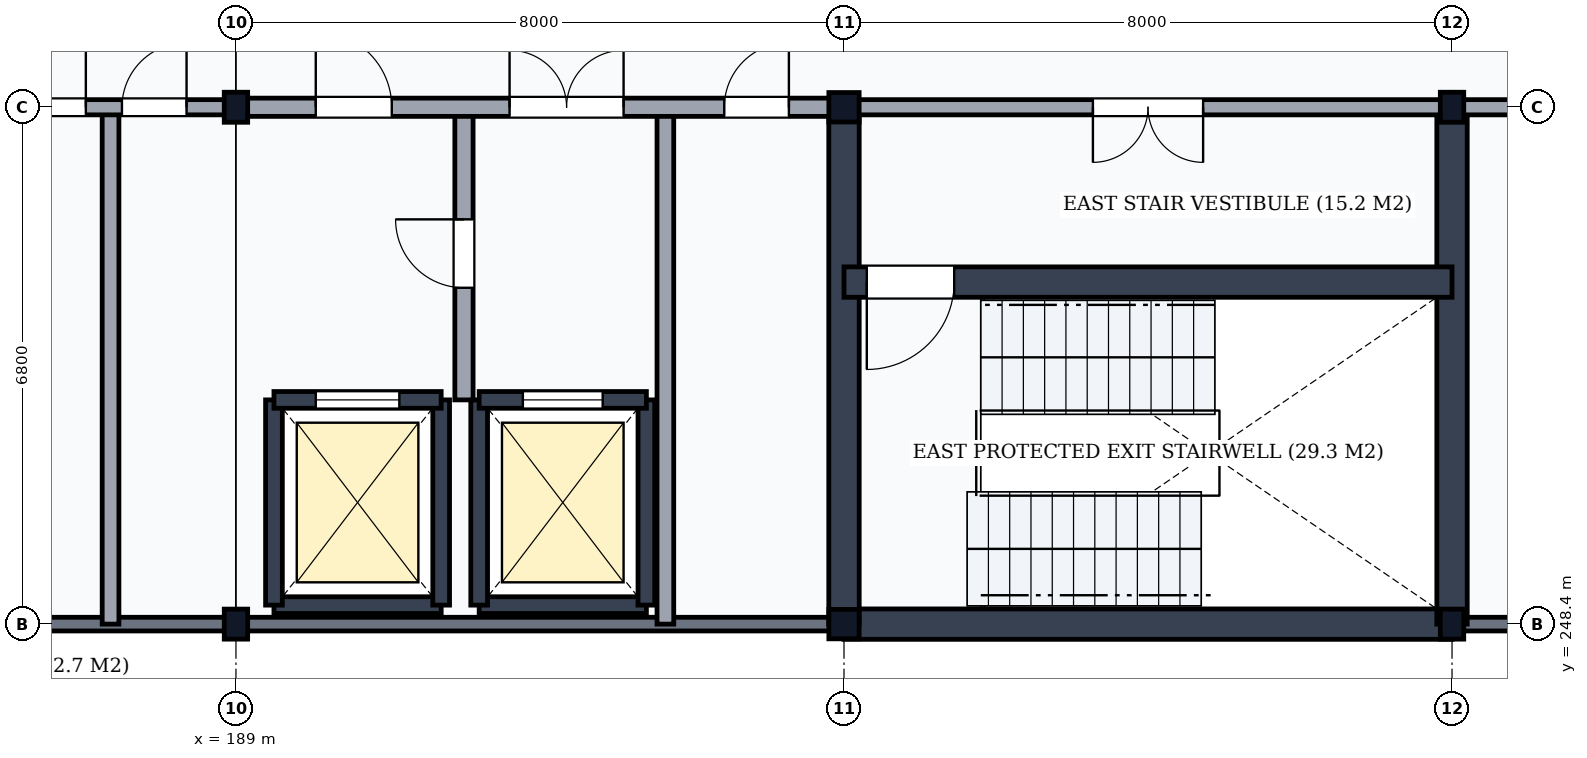
"""IFC4 building model, lengths in metres.
Left out: names, types, materials, properties, quantities, classifications, styles, units other than length and angle.
Written with IfcOpenShell. Run it as: python <this file> out.ifc"""

import sys

from ifc_helpers import new_model, si_unit, direction, frame, frame_2d, origin, origin_2d, place, context, subcontext, project, spatial, rectangle, i_section, extrude, element, fill, save


model = new_model("IFC4")
c1 = context("Model", 3, precision=1e-05, world=origin(), true_north=direction((0.0, 1.0)))
c2 = subcontext(c1, "Body", "Model", "MODEL_VIEW")
j1 = project(units=[si_unit("LENGTHUNIT", "METRE"), si_unit("PLANEANGLEUNIT", "RADIAN")], contexts=[c1])
p1 = place(None, origin())
s1 = spatial("IfcSite", under=j1, at=p1, CompositionType="ELEMENT")
p2 = place(p1, origin())
s2 = spatial("IfcBuilding", under=s1, at=p2, CompositionType="ELEMENT")
p3 = place(p2, frame((0.0, 0.0, 36.0)))
s3 = spatial("IfcBuildingStorey", under=s2, at=p3, CompositionType="ELEMENT", Elevation=36.0)
for number, where, z_axis, x_axis in (
    (1, (189.0, 248.4, 0.0), (0.0, 0.0, 1.0), (1.0, 0.0, 0.0)),
    (2, (189.0, 255.2, 0.0), (0.0, 0.0, 1.0), (1.0, 0.0, 0.0)),
):
    element("IfcColumn", number, at=place(p3, frame(where, z_axis=z_axis, x_axis=x_axis)), inside=s3, PredefinedType="COLUMN", context=c2, shape_type="SweptSolid", body=[
        extrude(i_section(OverallWidth=0.308, OverallDepth=0.395, WebThickness=0.021, FlangeThickness=0.04, FilletRadius=0.027, at=origin_2d()), origin(), (0.0, 0.0, 1.0), 3.9),
    ])
for number, where, z_axis, x_axis in (
    (3, (197.0, 248.4, 0.0), (0.0, 0.0, 1.0), (1.0, 0.0, 0.0)),
    (4, (197.0, 255.2, 0.0), (0.0, 0.0, 1.0), (1.0, 0.0, 0.0)),
):
    element("IfcColumn", number, at=place(p3, frame(where, z_axis=z_axis, x_axis=x_axis)), inside=s3, PredefinedType="COLUMN", context=c2, shape_type="SweptSolid", body=[
        extrude(i_section(OverallWidth=0.398, OverallDepth=0.387, WebThickness=0.021, FlangeThickness=0.033, FilletRadius=0.015, at=origin_2d()), origin(), (0.0, 0.0, 1.0), 3.9),
    ])
for number, where, z_axis, x_axis in (
    (5, (205.0, 248.4, 0.0), (0.0, 0.0, 1.0), (1.0, 0.0, 0.0)),
    (6, (205.0, 255.2, 0.0), (0.0, 0.0, 1.0), (1.0, 0.0, 0.0)),
):
    element("IfcColumn", number, at=place(p3, frame(where, z_axis=z_axis, x_axis=x_axis)), inside=s3, PredefinedType="COLUMN", context=c2, shape_type="SweptSolid", body=[
        extrude(i_section(OverallWidth=0.308, OverallDepth=0.395, WebThickness=0.021, FlangeThickness=0.04, FilletRadius=0.027, at=origin_2d()), origin(), (0.0, 0.0, 1.0), 3.9),
    ])
p4 = place(p3, frame((181.006, 248.4, 0.0), z_axis=(0.0, 0.0, 1.0), x_axis=(1.0, 0.0, 0.0)))
e7 = element("IfcWall", 7, at=p4, inside=s3, PredefinedType="SOLIDWALL", context=c2, shape_type="SweptSolid", body=[
    extrude(rectangle(XDim=7.988, YDim=0.18, at=frame_2d((3.994, 0.0))), origin(), (0.0, 0.0, 1.0), 3.368),
])
p5 = place(p4, frame((3.319, 0.0, 0.85)))
e8 = element("IfcOpeningElement", 8, at=p5, cuts=e7, PredefinedType="OPENING", context=c2, shape_type="SweptSolid", body=[
    extrude(rectangle(XDim=0.75, YDim=2.0, at=frame_2d((0.375, 1.0))), frame((0.0, 0.105, 0.0), z_axis=(0.0, -1.0, 0.0), x_axis=(1.0, 0.0, 0.0)), (0.0, 0.0, 1.0), 0.21),
])
p6 = place(p3, frame((189.006, 248.4, 0.0), z_axis=(0.0, 0.0, 1.0), x_axis=(1.0, 0.0, 0.0)))
e9 = element("IfcWall", 9, at=p6, inside=s3, PredefinedType="SOLIDWALL", context=c2, shape_type="SweptSolid", body=[
    extrude(rectangle(XDim=7.988, YDim=0.18, at=frame_2d((3.994, 0.0))), origin(), (0.0, 0.0, 1.0), 3.368),
])
p7 = place(p3, frame((205.006, 248.4, 0.0), z_axis=(0.0, 0.0, 1.0), x_axis=(1.0, 0.0, 0.0)))
e10 = element("IfcWall", 10, at=p7, inside=s3, PredefinedType="SOLIDWALL", context=c2, shape_type="SweptSolid", body=[
    extrude(rectangle(XDim=7.988, YDim=0.18, at=frame_2d((3.994, 0.0))), origin(), (0.0, 0.0, 1.0), 3.368),
])
p8 = place(p7, frame((3.194, 0.0, 0.95)))
e11 = element("IfcOpeningElement", 11, at=p8, cuts=e10, PredefinedType="OPENING", context=c2, shape_type="SweptSolid", body=[
    extrude(rectangle(XDim=1.6, YDim=2.0, at=frame_2d((0.8, 1.0))), frame((0.0, 0.105, 0.0), z_axis=(0.0, -1.0, 0.0), x_axis=(1.0, 0.0, 0.0)), (0.0, 0.0, 1.0), 0.21),
])
p9 = place(p3, frame((197.0, 248.4, 0.0), z_axis=(0.0, 0.0, 1.0), x_axis=(1.0, 0.0, 0.0)))
e12 = element("IfcWall", 12, at=p9, inside=s3, PredefinedType="SHEAR", context=c2, shape_type="SweptSolid", body=[
    extrude(rectangle(XDim=8.0, YDim=0.4, at=frame_2d((4.0, 0.0))), origin(), (0.0, 0.0, 1.0), 3.68),
])
for number, where, z_axis, x_axis in (
    (13, (197.0, 248.4, 0.0), (0.0, 0.0, 1.0), (0.0, 1.0, 0.0)),
    (14, (205.0, 248.4, 0.0), (0.0, 0.0, 1.0), (0.0, 1.0, 0.0)),
):
    element("IfcWall", number, at=place(p3, frame(where, z_axis=z_axis, x_axis=x_axis)), inside=s3, PredefinedType="SHEAR", context=c2, shape_type="SweptSolid", body=[
        extrude(rectangle(XDim=6.8, YDim=0.4, at=frame_2d((3.4, 0.0))), origin(), (0.0, 0.0, 1.0), 3.68),
    ])
p10 = place(p3, frame((197.0, 252.9, 0.0), z_axis=(0.0, 0.0, 1.0), x_axis=(1.0, 0.0, 0.0)))
e15 = element("IfcWall", 15, at=p10, inside=s3, PredefinedType="SHEAR", context=c2, shape_type="SweptSolid", body=[
    extrude(rectangle(XDim=8.0, YDim=0.4, at=frame_2d((4.0, 0.0))), origin(), (0.0, 0.0, 1.0), 3.68),
])
p11 = place(p10, frame((0.3, 0.0, 0.0)))
e16 = element("IfcOpeningElement", 16, at=p11, cuts=e15, PredefinedType="OPENING", context=c2, shape_type="SweptSolid", body=[
    extrude(rectangle(XDim=1.15, YDim=2.15, at=frame_2d((0.575, 1.075))), frame((0.0, 0.215, 0.0), z_axis=(0.0, -1.0, 0.0), x_axis=(1.0, 0.0, 0.0)), (0.0, 0.0, 1.0), 0.43),
])
p12 = place(p3, frame((197.0, 255.2, 0.0), z_axis=(0.0, 0.0, 1.0), x_axis=(1.0, 0.0, 0.0)))
e17 = element("IfcWall", 17, at=p12, inside=s3, PredefinedType="PARTITIONING", context=c2, shape_type="SweptSolid", body=[
    extrude(rectangle(XDim=8.0, YDim=0.2, at=frame_2d((4.0, 0.0))), origin(), (0.0, 0.0, 1.0), 3.178),
])
p13 = place(p12, frame((3.275, 0.0, 0.0)))
e18 = element("IfcOpeningElement", 18, at=p13, cuts=e17, PredefinedType="OPENING", context=c2, shape_type="SweptSolid", body=[
    extrude(rectangle(XDim=1.45, YDim=2.2, at=frame_2d((0.725, 1.1))), frame((0.0, 0.115, 0.0), z_axis=(0.0, -1.0, 0.0), x_axis=(1.0, 0.0, 0.0)), (0.0, 0.0, 1.0), 0.23),
])
p14 = place(p3, frame((189.5, 248.65, 0.0), z_axis=(0.0, 0.0, 1.0), x_axis=(1.0, 0.0, 0.0)))
e19 = element("IfcWall", 19, at=p14, inside=s3, PredefinedType="SHEAR", context=c2, shape_type="SweptSolid", body=[
    extrude(rectangle(XDim=2.2, YDim=0.22, at=frame_2d((1.1, 0.0))), origin(), (0.0, 0.0, 1.0), 3.68),
])
for number, where, z_axis, x_axis in (
    (20, (189.5, 248.65, 0.0), (0.0, 0.0, 1.0), (0.0, 1.0, 0.0)),
    (21, (191.7, 248.65, 0.0), (0.0, 0.0, 1.0), (0.0, 1.0, 0.0)),
):
    element("IfcWall", number, at=place(p3, frame(where, z_axis=z_axis, x_axis=x_axis)), inside=s3, PredefinedType="SHEAR", context=c2, shape_type="SweptSolid", body=[
        extrude(rectangle(XDim=2.7, YDim=0.22, at=frame_2d((1.35, 0.0))), origin(), (0.0, 0.0, 1.0), 3.68),
    ])
p15 = place(p3, frame((189.5, 251.35, 0.0), z_axis=(0.0, 0.0, 1.0), x_axis=(1.0, 0.0, 0.0)))
e22 = element("IfcWall", 22, at=p15, inside=s3, PredefinedType="SHEAR", context=c2, shape_type="SweptSolid", body=[
    extrude(rectangle(XDim=2.2, YDim=0.22, at=frame_2d((1.1, 0.0))), origin(), (0.0, 0.0, 1.0), 3.68),
])
p16 = place(p15, frame((0.55, 0.0, 0.0)))
e23 = element("IfcOpeningElement", 23, at=p16, cuts=e22, PredefinedType="OPENING", context=c2, shape_type="SweptSolid", body=[
    extrude(rectangle(XDim=1.1, YDim=2.15, at=frame_2d((0.55, 1.075))), frame((0.0, 0.125, 0.0), z_axis=(0.0, -1.0, 0.0), x_axis=(1.0, 0.0, 0.0)), (0.0, 0.0, 1.0), 0.25),
])
p17 = place(p3, frame((192.2, 248.65, 0.0), z_axis=(0.0, 0.0, 1.0), x_axis=(1.0, 0.0, 0.0)))
e24 = element("IfcWall", 24, at=p17, inside=s3, PredefinedType="SHEAR", context=c2, shape_type="SweptSolid", body=[
    extrude(rectangle(XDim=2.2, YDim=0.22, at=frame_2d((1.1, 0.0))), origin(), (0.0, 0.0, 1.0), 3.68),
])
for number, where, z_axis, x_axis in (
    (25, (192.2, 248.65, 0.0), (0.0, 0.0, 1.0), (0.0, 1.0, 0.0)),
    (26, (194.4, 248.65, 0.0), (0.0, 0.0, 1.0), (0.0, 1.0, 0.0)),
):
    element("IfcWall", number, at=place(p3, frame(where, z_axis=z_axis, x_axis=x_axis)), inside=s3, PredefinedType="SHEAR", context=c2, shape_type="SweptSolid", body=[
        extrude(rectangle(XDim=2.7, YDim=0.22, at=frame_2d((1.35, 0.0))), origin(), (0.0, 0.0, 1.0), 3.68),
    ])
p18 = place(p3, frame((192.2, 251.35, 0.0), z_axis=(0.0, 0.0, 1.0), x_axis=(1.0, 0.0, 0.0)))
e27 = element("IfcWall", 27, at=p18, inside=s3, PredefinedType="SHEAR", context=c2, shape_type="SweptSolid", body=[
    extrude(rectangle(XDim=2.2, YDim=0.22, at=frame_2d((1.1, 0.0))), origin(), (0.0, 0.0, 1.0), 3.68),
])
p19 = place(p18, frame((0.575, 0.0, 0.0)))
e28 = element("IfcOpeningElement", 28, at=p19, cuts=e27, PredefinedType="OPENING", context=c2, shape_type="SweptSolid", body=[
    extrude(rectangle(XDim=1.05, YDim=2.15, at=frame_2d((0.525, 1.075))), frame((0.0, 0.125, 0.0), z_axis=(0.0, -1.0, 0.0), x_axis=(1.0, 0.0, 0.0)), (0.0, 0.0, 1.0), 0.25),
])
p20 = place(p3, frame((192.0, 251.35, 0.0), z_axis=(0.0, 0.0, 1.0), x_axis=(0.0, 1.0, 0.0)))
e29 = element("IfcWall", 29, at=p20, inside=s3, PredefinedType="PARTITIONING", context=c2, shape_type="SweptSolid", body=[
    extrude(rectangle(XDim=3.85, YDim=0.24, at=frame_2d((1.925, 0.0))), origin(), (0.0, 0.0, 1.0), 3.68),
])
p21 = place(p20, frame((1.475, 0.0, 0.0)))
e30 = element("IfcOpeningElement", 30, at=p21, cuts=e29, PredefinedType="OPENING", context=c2, shape_type="SweptSolid", body=[
    extrude(rectangle(XDim=0.9, YDim=2.1, at=frame_2d((0.45, 1.05))), frame((0.0, 0.135, 0.0), z_axis=(0.0, -1.0, 0.0), x_axis=(1.0, 0.0, 0.0)), (0.0, 0.0, 1.0), 0.27),
])
for number, where, z_axis, x_axis in (
    (31, (194.65, 248.4, 0.0), (0.0, 0.0, 1.0), (0.0, 1.0, 0.0)),
    (32, (187.35, 248.4, 0.0), (0.0, 0.0, 1.0), (0.0, 1.0, 0.0)),
):
    element("IfcWall", number, at=place(p3, frame(where, z_axis=z_axis, x_axis=x_axis)), inside=s3, PredefinedType="PARTITIONING", context=c2, shape_type="SweptSolid", body=[
        extrude(rectangle(XDim=6.8, YDim=0.22, at=frame_2d((3.4, 0.0))), origin(), (0.0, 0.0, 1.0), 3.68),
    ])
p22 = place(p3, frame((181.0, 255.2, 0.0), z_axis=(0.0, 0.0, 1.0), x_axis=(1.0, 0.0, 0.0)))
e33 = element("IfcWall", 33, at=p22, inside=s3, PredefinedType="PARTITIONING", context=c2, shape_type="SweptSolid", body=[
    extrude(rectangle(XDim=8.0, YDim=0.2, at=frame_2d((4.0, 0.0))), origin(), (0.0, 0.0, 1.0), 3.178),
])
p23 = place(p22, frame((0.85, 0.0, 0.0)))
e34 = element("IfcOpeningElement", 34, at=p23, cuts=e33, PredefinedType="OPENING", context=c2, shape_type="SweptSolid", body=[
    extrude(rectangle(XDim=0.9, YDim=2.1, at=frame_2d((0.45, 1.05))), frame((0.0, 0.115, 0.0), z_axis=(0.0, -1.0, 0.0), x_axis=(1.0, 0.0, 0.0)), (0.0, 0.0, 1.0), 0.23),
])
p24 = place(p22, frame((3.25, 0.0, 0.0)))
e35 = element("IfcOpeningElement", 35, at=p24, cuts=e33, PredefinedType="OPENING", context=c2, shape_type="SweptSolid", body=[
    extrude(rectangle(XDim=0.9, YDim=2.1, at=frame_2d((0.45, 1.05))), frame((0.0, 0.115, 0.0), z_axis=(0.0, -1.0, 0.0), x_axis=(1.0, 0.0, 0.0)), (0.0, 0.0, 1.0), 0.23),
])
p25 = place(p22, frame((5.075, 0.0, 0.0)))
e36 = element("IfcOpeningElement", 36, at=p25, cuts=e33, PredefinedType="OPENING", context=c2, shape_type="SweptSolid", body=[
    extrude(rectangle(XDim=0.95, YDim=2.1, at=frame_2d((0.475, 1.05))), frame((0.0, 0.115, 0.0), z_axis=(0.0, -1.0, 0.0), x_axis=(1.0, 0.0, 0.0)), (0.0, 0.0, 1.0), 0.23),
])
p26 = place(p22, frame((6.5, 0.0, 0.0)))
e37 = element("IfcOpeningElement", 37, at=p26, cuts=e33, PredefinedType="OPENING", context=c2, shape_type="SweptSolid", body=[
    extrude(rectangle(XDim=0.85, YDim=2.1, at=frame_2d((0.425, 1.05))), frame((0.0, 0.115, 0.0), z_axis=(0.0, -1.0, 0.0), x_axis=(1.0, 0.0, 0.0)), (0.0, 0.0, 1.0), 0.23),
])
p27 = place(p3, frame((189.0, 255.2, 0.0), z_axis=(0.0, 0.0, 1.0), x_axis=(1.0, 0.0, 0.0)))
e38 = element("IfcWall", 38, at=p27, inside=s3, PredefinedType="PARTITIONING", context=c2, shape_type="SweptSolid", body=[
    extrude(rectangle(XDim=8.0, YDim=0.24, at=frame_2d((4.0, 0.0))), origin(), (0.0, 0.0, 1.0), 3.178),
])
p28 = place(p27, frame((1.05, 0.0, 0.0)))
e39 = element("IfcOpeningElement", 39, at=p28, cuts=e38, PredefinedType="OPENING", context=c2, shape_type="SweptSolid", body=[
    extrude(rectangle(XDim=1.0, YDim=2.1, at=frame_2d((0.5, 1.05))), frame((0.0, 0.135, 0.0), z_axis=(0.0, -1.0, 0.0), x_axis=(1.0, 0.0, 0.0)), (0.0, 0.0, 1.0), 0.27),
])
p29 = place(p27, frame((3.6, 0.0, 0.0)))
e40 = element("IfcOpeningElement", 40, at=p29, cuts=e38, PredefinedType="OPENING", context=c2, shape_type="SweptSolid", body=[
    extrude(rectangle(XDim=1.5, YDim=2.25, at=frame_2d((0.75, 1.125))), frame((0.0, 0.135, 0.0), z_axis=(0.0, -1.0, 0.0), x_axis=(1.0, 0.0, 0.0)), (0.0, 0.0, 1.0), 0.27),
])
p30 = place(p27, frame((6.425, 0.0, 0.0)))
e41 = element("IfcOpeningElement", 41, at=p30, cuts=e38, PredefinedType="OPENING", context=c2, shape_type="SweptSolid", body=[
    extrude(rectangle(XDim=0.85, YDim=2.1, at=frame_2d((0.425, 1.05))), frame((0.0, 0.135, 0.0), z_axis=(0.0, -1.0, 0.0), x_axis=(1.0, 0.0, 0.0)), (0.0, 0.0, 1.0), 0.27),
])
p31 = place(p3, frame((205.0, 255.2, 0.0), z_axis=(0.0, 0.0, 1.0), x_axis=(1.0, 0.0, 0.0)))
e42 = element("IfcWall", 42, at=p31, inside=s3, PredefinedType="PARTITIONING", context=c2, shape_type="SweptSolid", body=[
    extrude(rectangle(XDim=16.0, YDim=0.2, at=frame_2d((8.0, 0.0))), origin(), (0.0, 0.0, 1.0), 3.178),
])
p32 = place(p31, frame((3.5, 0.0, 0.0)))
e43 = element("IfcOpeningElement", 43, at=p32, cuts=e42, PredefinedType="OPENING", context=c2, shape_type="SweptSolid", body=[
    extrude(rectangle(XDim=1.0, YDim=2.1, at=frame_2d((0.5, 1.05))), frame((0.0, 0.115, 0.0), z_axis=(0.0, -1.0, 0.0), x_axis=(1.0, 0.0, 0.0)), (0.0, 0.0, 1.0), 0.23),
])
p33 = place(p11, frame((1.15, 0.0, 0.0), z_axis=(0.0, 0.0, 1.0), x_axis=(-1.0, 0.0, 0.0)))
e44 = element("IfcDoor", 44, at=p33, inside=s3, OperationType="SINGLE_SWING_RIGHT", PredefinedType="DOOR", context=c2, shape_type="SweptSolid", body=[
    extrude(rectangle(XDim=1.15, YDim=2.15, at=frame_2d((0.575, 1.075))), frame((0.0, 0.025, 0.0), z_axis=(0.0, -1.0, 0.0), x_axis=(1.0, 0.0, 0.0)), (0.0, 0.0, 1.0), 0.05),
])
fill(e16, e44)
p34 = place(p13, frame((1.45, 0.0, 0.0), z_axis=(0.0, 0.0, 1.0), x_axis=(-1.0, 0.0, 0.0)))
e45 = element("IfcDoor", 45, at=p34, inside=s3, OperationType="DOUBLE_DOOR_SINGLE_SWING", PredefinedType="DOOR", context=c2, shape_type="SweptSolid", body=[
    extrude(rectangle(XDim=1.45, YDim=2.2, at=frame_2d((0.725, 1.1))), frame((0.0, 0.025, 0.0), z_axis=(0.0, -1.0, 0.0), x_axis=(1.0, 0.0, 0.0)), (0.0, 0.0, 1.0), 0.05),
])
fill(e18, e45)
p35 = place(p16, origin())
e46 = element("IfcDoor", 46, at=p35, inside=s3, OperationType="DOUBLE_DOOR_SLIDING", PredefinedType="USERDEFINED", context=c2, shape_type="SweptSolid", body=[
    extrude(rectangle(XDim=1.1, YDim=2.15, at=frame_2d((0.55, 1.075))), frame((0.0, 0.025, 0.0), z_axis=(0.0, -1.0, 0.0), x_axis=(1.0, 0.0, 0.0)), (0.0, 0.0, 1.0), 0.05),
])
fill(e23, e46)
p36 = place(p19, origin())
e47 = element("IfcDoor", 47, at=p36, inside=s3, OperationType="DOUBLE_DOOR_SLIDING", PredefinedType="USERDEFINED", context=c2, shape_type="SweptSolid", body=[
    extrude(rectangle(XDim=1.05, YDim=2.15, at=frame_2d((0.525, 1.075))), frame((0.0, 0.025, 0.0), z_axis=(0.0, -1.0, 0.0), x_axis=(1.0, 0.0, 0.0)), (0.0, 0.0, 1.0), 0.05),
])
fill(e28, e47)
p37 = place(p21, frame((0.9, 0.0, 0.0), z_axis=(0.0, 0.0, 1.0), x_axis=(-1.0, 0.0, 0.0)))
e48 = element("IfcDoor", 48, at=p37, inside=s3, OperationType="SINGLE_SWING_LEFT", PredefinedType="DOOR", context=c2, shape_type="SweptSolid", body=[
    extrude(rectangle(XDim=0.9, YDim=2.1, at=frame_2d((0.45, 1.05))), frame((0.0, 0.025, 0.0), z_axis=(0.0, -1.0, 0.0), x_axis=(1.0, 0.0, 0.0)), (0.0, 0.0, 1.0), 0.05),
])
fill(e30, e48)
p38 = place(p25, frame((0.95, 0.0, 0.0), z_axis=(0.0, 0.0, 1.0), x_axis=(-1.0, 0.0, 0.0)))
e49 = element("IfcDoor", 49, at=p38, inside=s3, OperationType="SINGLE_SWING_LEFT", PredefinedType="DOOR", context=c2, shape_type="SweptSolid", body=[
    extrude(rectangle(XDim=0.95, YDim=2.1, at=frame_2d((0.475, 1.05))), frame((0.0, 0.025, 0.0), z_axis=(0.0, -1.0, 0.0), x_axis=(1.0, 0.0, 0.0)), (0.0, 0.0, 1.0), 0.05),
])
fill(e36, e49)
p39 = place(p26, frame((0.85, 0.0, 0.0), z_axis=(0.0, 0.0, 1.0), x_axis=(-1.0, 0.0, 0.0)))
e50 = element("IfcDoor", 50, at=p39, inside=s3, OperationType="SINGLE_SWING_LEFT", PredefinedType="DOOR", context=c2, shape_type="SweptSolid", body=[
    extrude(rectangle(XDim=0.85, YDim=2.1, at=frame_2d((0.425, 1.05))), frame((0.0, 0.025, 0.0), z_axis=(0.0, -1.0, 0.0), x_axis=(1.0, 0.0, 0.0)), (0.0, 0.0, 1.0), 0.05),
])
fill(e37, e50)
p40 = place(p28, origin())
e51 = element("IfcDoor", 51, at=p40, inside=s3, OperationType="SINGLE_SWING_LEFT", PredefinedType="DOOR", context=c2, shape_type="SweptSolid", body=[
    extrude(rectangle(XDim=1.0, YDim=2.1, at=frame_2d((0.5, 1.05))), frame((0.0, 0.025, 0.0), z_axis=(0.0, -1.0, 0.0), x_axis=(1.0, 0.0, 0.0)), (0.0, 0.0, 1.0), 0.05),
])
fill(e39, e51)
p41 = place(p29, origin())
e52 = element("IfcDoor", 52, at=p41, inside=s3, OperationType="DOUBLE_DOOR_SINGLE_SWING", PredefinedType="DOOR", context=c2, shape_type="SweptSolid", body=[
    extrude(rectangle(XDim=1.5, YDim=2.25, at=frame_2d((0.75, 1.125))), frame((0.0, 0.025, 0.0), z_axis=(0.0, -1.0, 0.0), x_axis=(1.0, 0.0, 0.0)), (0.0, 0.0, 1.0), 0.05),
])
fill(e40, e52)
p42 = place(p30, frame((0.85, 0.0, 0.0), z_axis=(0.0, 0.0, 1.0), x_axis=(-1.0, 0.0, 0.0)))
e53 = element("IfcDoor", 53, at=p42, inside=s3, OperationType="SINGLE_SWING_LEFT", PredefinedType="DOOR", context=c2, shape_type="SweptSolid", body=[
    extrude(rectangle(XDim=0.85, YDim=2.1, at=frame_2d((0.425, 1.05))), frame((0.0, 0.025, 0.0), z_axis=(0.0, -1.0, 0.0), x_axis=(1.0, 0.0, 0.0)), (0.0, 0.0, 1.0), 0.05),
])
fill(e41, e53)
save(model, sys.argv[1])
